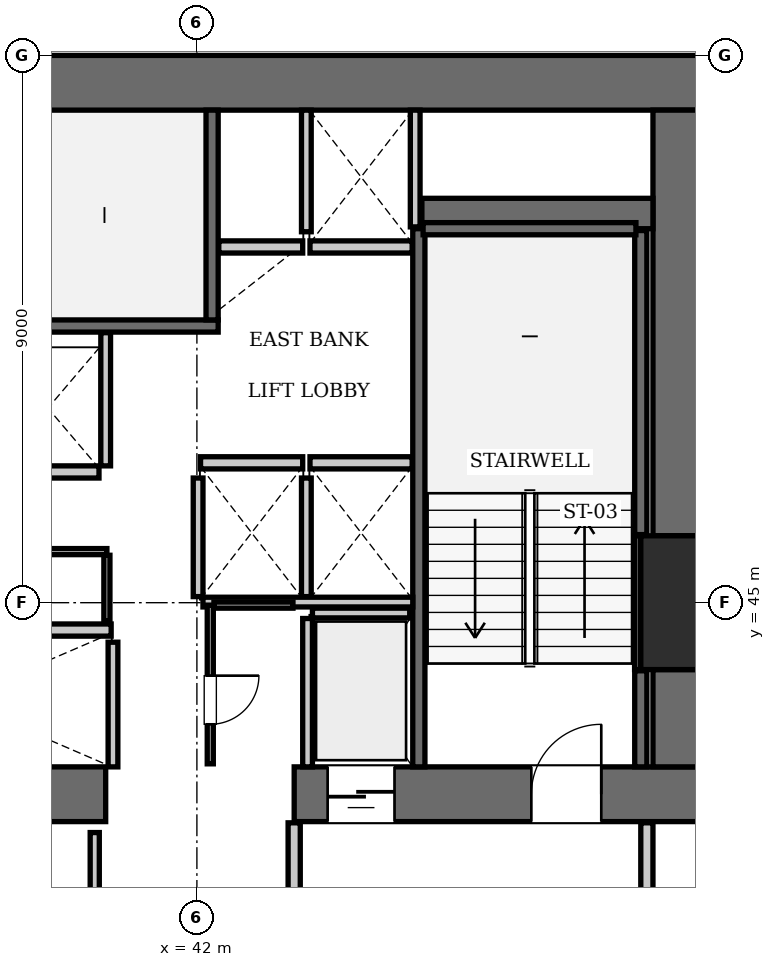
"""IFC4 building model, lengths in metres.
Left out: names, types, materials, properties, quantities, classifications, styles, units other than length and angle.
Written with IfcOpenShell. Run it as: python <this file> out.ifc"""

import sys

from ifc_helpers import new_model, si_unit, direction, frame, frame_2d, origin, origin_2d, place, context, subcontext, project, spatial, rectangle, extrude, element, fill, save


model = new_model("IFC4")
c1 = context("Model", 3, precision=1e-05, world=origin(), true_north=direction((0.0, 1.0)))
c2 = subcontext(c1, "Body", "Model", "MODEL_VIEW")
j1 = project(units=[si_unit("LENGTHUNIT", "METRE"), si_unit("PLANEANGLEUNIT", "RADIAN")], contexts=[c1])
p1 = place(None, origin())
s1 = spatial("IfcSite", under=j1, at=p1, CompositionType="ELEMENT")
p2 = place(p1, origin())
s2 = spatial("IfcBuilding", under=s1, at=p2, CompositionType="ELEMENT")
p3 = place(p2, frame((0.0, 0.0, 73.15)))
s3 = spatial("IfcBuildingStorey", under=s2, at=p3, CompositionType="ELEMENT", Elevation=73.15)
p4 = place(p3, frame((50.4, 45.0, 0.0), z_axis=(0.0, 0.0, 1.0), x_axis=(1.0, 0.0, 0.0)))
e1 = element("IfcColumn", 1, at=p4, inside=s3, PredefinedType="COLUMN", context=c2, shape_type="SweptSolid", body=[
    extrude(rectangle(XDim=2.2, YDim=2.2, at=origin_2d()), origin(), (0.0, 0.0, 1.0), 3.85),
])
p5 = place(p3, frame((25.2, 53.55, 0.0), z_axis=(0.0, 0.0, 1.0), x_axis=(1.0, 0.0, 0.0)))
e2 = element("IfcWall", 2, at=p5, inside=s3, PredefinedType="SHEAR", context=c2, shape_type="SweptSolid", body=[
    extrude(rectangle(XDim=25.2, YDim=0.9, at=frame_2d((12.6, 0.0))), origin(), (0.0, 0.0, 1.0), 3.85),
])
p6 = place(p3, frame((35.1, 41.85, 0.0), z_axis=(0.0, 0.0, 1.0), x_axis=(1.0, 0.0, 0.0)))
e3 = element("IfcWall", 3, at=p6, inside=s3, PredefinedType="SHEAR", context=c2, shape_type="SweptSolid", body=[
    extrude(rectangle(XDim=5.4, YDim=0.9, at=frame_2d((2.7, 0.0))), origin(), (0.0, 0.0, 1.0), 3.85),
])
p7 = place(p3, frame((43.6, 41.85, 0.0), z_axis=(0.0, 0.0, 1.0), x_axis=(1.0, 0.0, 0.0)))
e4 = element("IfcWall", 4, at=p7, inside=s3, PredefinedType="SHEAR", context=c2, shape_type="SweptSolid", body=[
    extrude(rectangle(XDim=6.8, YDim=0.9, at=frame_2d((3.4, 0.0))), origin(), (0.0, 0.0, 1.0), 3.85),
])
p8 = place(p7, frame((3.9, 0.0, 0.0)))
e5 = element("IfcOpeningElement", 5, at=p8, cuts=e4, PredefinedType="OPENING", context=c2, shape_type="SweptSolid", body=[
    extrude(rectangle(XDim=1.15, YDim=2.15, at=frame_2d((0.575, 1.075))), frame((0.0, 0.46, 0.0), z_axis=(0.0, -1.0, 0.0), x_axis=(1.0, 0.0, 0.0)), (0.0, 0.0, 1.0), 0.92),
])
p9 = place(p7, frame((0.55, 0.0, 0.0)))
e6 = element("IfcOpeningElement", 6, at=p9, cuts=e4, PredefinedType="OPENING", context=c2, shape_type="SweptSolid", body=[
    extrude(rectangle(XDim=1.1, YDim=2.2, at=frame_2d((0.55, 1.1))), frame((0.0, 0.46, 0.0), z_axis=(0.0, -1.0, 0.0), x_axis=(1.0, 0.0, 0.0)), (0.0, 0.0, 1.0), 0.92),
])
p10 = place(p3, frame((49.95, 42.3, 0.0), z_axis=(0.0, 0.0, 1.0), x_axis=(0.0, 1.0, 0.0)))
e7 = element("IfcWall", 7, at=p10, inside=s3, PredefinedType="SHEAR", context=c2, shape_type="SweptSolid", body=[
    extrude(rectangle(XDim=1.6, YDim=0.9, at=frame_2d((0.8, 0.0))), origin(), (0.0, 0.0, 1.0), 3.85),
])
p11 = place(p3, frame((49.95, 46.1, 0.0), z_axis=(0.0, 0.0, 1.0), x_axis=(0.0, 1.0, 0.0)))
e8 = element("IfcWall", 8, at=p11, inside=s3, PredefinedType="SHEAR", context=c2, shape_type="SweptSolid", body=[
    extrude(rectangle(XDim=7.0, YDim=0.9, at=frame_2d((3.5, 0.0))), origin(), (0.0, 0.0, 1.0), 3.85),
])
p12 = place(p3, frame((45.7, 51.4, 0.0), z_axis=(0.0, 0.0, 1.0), x_axis=(1.0, 0.0, 0.0)))
e9 = element("IfcWall", 9, at=p12, inside=s3, PredefinedType="SHEAR", context=c2, shape_type="SweptSolid", body=[
    extrude(rectangle(XDim=3.8, YDim=0.5, at=frame_2d((1.9, 0.0))), origin(), (0.0, 0.0, 1.0), 3.85),
])
p13 = place(p3, frame((33.25, 49.55, 0.0), z_axis=(0.0, 0.0, 1.0), x_axis=(1.0, 0.0, 0.0)))
e10 = element("IfcWall", 10, at=p13, inside=s3, PredefinedType="SOLIDWALL", context=c2, shape_type="SweptSolid", body=[
    extrude(rectangle(XDim=9.1, YDim=0.2, at=frame_2d((4.55, 0.0))), origin(), (0.0, 0.0, 1.0), 3.61),
])
p14 = place(p3, frame((42.25, 49.65, 0.0), z_axis=(0.0, 0.0, 1.0), x_axis=(0.0, 1.0, 0.0)))
e11 = element("IfcWall", 11, at=p14, inside=s3, PredefinedType="SOLIDWALL", context=c2, shape_type="SweptSolid", body=[
    extrude(rectangle(XDim=3.45, YDim=0.2, at=frame_2d((1.725, 0.0))), origin(), (0.0, 0.0, 1.0), 3.61),
])
p15 = place(p3, frame((45.65, 42.3, 0.0), z_axis=(0.0, 0.0, 1.0), x_axis=(0.0, 1.0, 0.0)))
e12 = element("IfcWall", 12, at=p15, inside=s3, PredefinedType="SOLIDWALL", context=c2, shape_type="SweptSolid", body=[
    extrude(rectangle(XDim=8.85, YDim=0.2, at=frame_2d((4.425, 0.0))), origin(), (0.0, 0.0, 1.0), 3.61),
])
p16 = place(p3, frame((49.3, 42.3, 0.0), z_axis=(0.0, 0.0, 1.0), x_axis=(0.0, 1.0, 0.0)))
e13 = element("IfcWall", 13, at=p16, inside=s3, PredefinedType="SOLIDWALL", context=c2, shape_type="SweptSolid", body=[
    extrude(rectangle(XDim=1.58, YDim=0.2, at=frame_2d((0.79, 0.0))), origin(), (0.0, 0.0, 1.0), 3.61),
])
p17 = place(p3, frame((49.3, 46.12, 0.0), z_axis=(0.0, 0.0, 1.0), x_axis=(0.0, 1.0, 0.0)))
e14 = element("IfcWall", 14, at=p17, inside=s3, PredefinedType="SOLIDWALL", context=c2, shape_type="SweptSolid", body=[
    extrude(rectangle(XDim=5.0, YDim=0.2, at=frame_2d((2.5, 0.0))), origin(), (0.0, 0.0, 1.0), 3.61),
])
p18 = place(p3, frame((45.72, 51.15, 0.0), z_axis=(0.0, 0.0, 1.0), x_axis=(1.0, 0.0, 0.0)))
e15 = element("IfcWall", 15, at=p18, inside=s3, PredefinedType="SOLIDWALL", context=c2, shape_type="SweptSolid", body=[
    extrude(rectangle(XDim=3.5, YDim=0.2, at=frame_2d((1.75, 0.0))), origin(), (0.0, 0.0, 1.0), 3.61),
])
p19 = place(p3, frame((49.248, 43.9, 0.0), z_axis=(0.0, 0.0, 1.0), x_axis=(0.0, 1.0, 0.0)))
e16 = element("IfcWall", 16, at=p19, inside=s3, PredefinedType="SOLIDWALL", context=c2, shape_type="SweptSolid", body=[
    extrude(rectangle(XDim=2.2, YDim=0.1, at=frame_2d((1.1, 0.0))), origin(), (0.0, 0.0, 1.0), 3.61),
])
for number, where, z_axis, x_axis in (
    (17, (42.06, 47.3, 0.0), (0.0, 0.0, 1.0), (1.0, 0.0, 0.0)),
    (18, (43.86, 47.3, 0.0), (0.0, 0.0, 1.0), (1.0, 0.0, 0.0)),
):
    element("IfcWall", number, at=place(p3, frame(where, z_axis=z_axis, x_axis=x_axis)), inside=s3, PredefinedType="SOLIDWALL", context=c2, shape_type="SweptSolid", body=[
        extrude(rectangle(XDim=1.68, YDim=0.2, at=frame_2d((0.84, 0.0))), origin(), (0.0, 0.0, 1.0), 3.61),
    ])
p20 = place(p3, frame((42.36, 50.85, 0.0), z_axis=(0.0, 0.0, 1.0), x_axis=(1.0, 0.0, 0.0)))
e19 = element("IfcWall", 19, at=p20, inside=s3, PredefinedType="SOLIDWALL", context=c2, shape_type="SweptSolid", body=[
    extrude(rectangle(XDim=1.38, YDim=0.2, at=frame_2d((0.69, 0.0))), origin(), (0.0, 0.0, 1.0), 3.61),
])
p21 = place(p3, frame((43.86, 50.85, 0.0), z_axis=(0.0, 0.0, 1.0), x_axis=(1.0, 0.0, 0.0)))
e20 = element("IfcWall", 20, at=p21, inside=s3, PredefinedType="SOLIDWALL", context=c2, shape_type="SweptSolid", body=[
    extrude(rectangle(XDim=1.68, YDim=0.2, at=frame_2d((0.84, 0.0))), origin(), (0.0, 0.0, 1.0), 3.61),
])
p22 = place(p3, frame((38.91, 44.55, 0.0), z_axis=(0.0, 0.0, 1.0), x_axis=(1.0, 0.0, 0.0)))
e21 = element("IfcWall", 21, at=p22, inside=s3, PredefinedType="SOLIDWALL", context=c2, shape_type="SweptSolid", body=[
    extrude(rectangle(XDim=1.68, YDim=0.2, at=frame_2d((0.84, 0.0))), origin(), (0.0, 0.0, 1.0), 3.61),
])
p23 = place(p3, frame((38.71, 47.15, 0.0), z_axis=(0.0, 0.0, 1.0), x_axis=(1.0, 0.0, 0.0)))
e22 = element("IfcWall", 22, at=p23, inside=s3, PredefinedType="SOLIDWALL", context=c2, shape_type="SweptSolid", body=[
    extrude(rectangle(XDim=1.68, YDim=0.2, at=frame_2d((0.84, 0.0))), origin(), (0.0, 0.0, 1.0), 3.61),
])
p24 = place(p3, frame((43.9, 44.83, 0.0), z_axis=(0.0, 0.0, 1.0), x_axis=(1.0, 0.0, 0.0)))
e23 = element("IfcWall", 23, at=p24, inside=s3, PredefinedType="SOLIDWALL", context=c2, shape_type="SweptSolid", body=[
    extrude(rectangle(XDim=1.6, YDim=0.16, at=frame_2d((0.8, 0.0))), origin(), (0.0, 0.0, 1.0), 3.61),
])
p25 = place(p3, frame((43.82, 42.3, 0.0), z_axis=(0.0, 0.0, 1.0), x_axis=(0.0, 1.0, 0.0)))
e24 = element("IfcWall", 24, at=p25, inside=s3, PredefinedType="SOLIDWALL", context=c2, shape_type="SweptSolid", body=[
    extrude(rectangle(XDim=2.44, YDim=0.16, at=frame_2d((1.22, 0.0))), origin(), (0.0, 0.0, 1.0), 3.61),
])
for number, where, z_axis, x_axis in (
    (25, (42.02, 45.1, 0.0), (0.0, 0.0, 1.0), (0.0, 1.0, 0.0)),
    (26, (43.8, 45.1, 0.0), (0.0, 0.0, 1.0), (0.0, 1.0, 0.0)),
):
    element("IfcWall", number, at=place(p3, frame(where, z_axis=z_axis, x_axis=x_axis)), inside=s3, PredefinedType="SOLIDWALL", context=c2, shape_type="SweptSolid", body=[
        extrude(rectangle(XDim=1.95, YDim=0.16, at=frame_2d((0.975, 0.0))), origin(), (0.0, 0.0, 1.0), 3.61),
    ])
p26 = place(p3, frame((42.1, 45.01, 0.0), z_axis=(0.0, 0.0, 1.0), x_axis=(1.0, 0.0, 0.0)))
e27 = element("IfcWall", 27, at=p26, inside=s3, PredefinedType="SOLIDWALL", context=c2, shape_type="SweptSolid", body=[
    extrude(rectangle(XDim=3.45, YDim=0.16, at=frame_2d((1.725, 0.0))), origin(), (0.0, 0.0, 1.0), 3.61),
])
p27 = place(p3, frame((45.59, 51.18, 0.0), z_axis=(0.0, 0.0, 1.0), x_axis=(0.0, 1.0, 0.0)))
e28 = element("IfcWall", 28, at=p27, inside=s3, PredefinedType="SOLIDWALL", context=c2, shape_type="SweptSolid", body=[
    extrude(rectangle(XDim=1.92, YDim=0.16, at=frame_2d((0.96, 0.0))), origin(), (0.0, 0.0, 1.0), 3.61),
])
p28 = place(p3, frame((43.8, 51.1, 0.0), z_axis=(0.0, 0.0, 1.0), x_axis=(0.0, 1.0, 0.0)))
e29 = element("IfcWall", 29, at=p28, inside=s3, PredefinedType="SOLIDWALL", context=c2, shape_type="SweptSolid", body=[
    extrude(rectangle(XDim=2.0, YDim=0.16, at=frame_2d((1.0, 0.0))), origin(), (0.0, 0.0, 1.0), 3.61),
])
p29 = place(p3, frame((40.62, 42.3, 0.0), z_axis=(0.0, 0.0, 1.0), x_axis=(0.0, 1.0, 0.0)))
e30 = element("IfcWall", 30, at=p29, inside=s3, PredefinedType="SOLIDWALL", context=c2, shape_type="SweptSolid", body=[
    extrude(rectangle(XDim=2.05, YDim=0.16, at=frame_2d((1.025, 0.0))), origin(), (0.0, 0.0, 1.0), 3.61),
])
p30 = place(p3, frame((40.5, 47.25, 0.0), z_axis=(0.0, 0.0, 1.0), x_axis=(0.0, 1.0, 0.0)))
e31 = element("IfcWall", 31, at=p30, inside=s3, PredefinedType="SOLIDWALL", context=c2, shape_type="SweptSolid", body=[
    extrude(rectangle(XDim=2.19, YDim=0.16, at=frame_2d((1.095, 0.0))), origin(), (0.0, 0.0, 1.0), 3.61),
])
for number, where, z_axis, x_axis in (
    (32, (43.6, 38.31, 0.0), (0.0, 0.0, 1.0), (0.0, 1.0, 0.0)),
    (33, (49.4, 38.31, 0.0), (0.0, 0.0, 1.0), (0.0, 1.0, 0.0)),
):
    element("IfcWall", number, at=place(p3, frame(where, z_axis=z_axis, x_axis=x_axis)), inside=s3, PredefinedType="PARTITIONING", context=c2, shape_type="SweptSolid", body=[
        extrude(rectangle(XDim=3.07, YDim=0.2, at=frame_2d((1.535, 0.0))), origin(), (0.0, 0.0, 1.0), 3.61),
    ])
p31 = place(p3, frame((38.02, 45.84, 0.0), z_axis=(0.0, 0.0, 1.0), x_axis=(1.0, 0.0, 0.0)))
e34 = element("IfcWall", 34, at=p31, inside=s3, PredefinedType="PARTITIONING", context=c2, shape_type="SweptSolid", body=[
    extrude(rectangle(XDim=2.5, YDim=0.1, at=frame_2d((1.25, 0.0))), origin(), (0.0, 0.0, 1.0), 3.61),
])
p32 = place(p31, frame((0.75, 0.0, 0.0)))
e35 = element("IfcOpeningElement", 35, at=p32, cuts=e34, PredefinedType="OPENING", context=c2, shape_type="SweptSolid", body=[
    extrude(rectangle(XDim=0.8, YDim=2.05, at=frame_2d((0.4, 1.025))), frame((0.0, 0.06, 0.0), z_axis=(0.0, -1.0, 0.0), x_axis=(1.0, 0.0, 0.0)), (0.0, 0.0, 1.0), 0.12),
])
p33 = place(p3, frame((40.52, 44.7, 0.0), z_axis=(0.0, 0.0, 1.0), x_axis=(0.0, 1.0, 0.0)))
e36 = element("IfcWall", 36, at=p33, inside=s3, PredefinedType="PARTITIONING", context=c2, shape_type="SweptSolid", body=[
    extrude(rectangle(XDim=1.08, YDim=0.1, at=frame_2d((0.54, 0.0))), origin(), (0.0, 0.0, 1.0), 3.61),
])
p34 = place(p3, frame((42.22, 42.35, 0.0), z_axis=(0.0, 0.0, 1.0), x_axis=(0.0, 1.0, 0.0)))
e37 = element("IfcWall", 37, at=p34, inside=s3, PredefinedType="PARTITIONING", context=c2, shape_type="SweptSolid", body=[
    extrude(rectangle(XDim=2.61, YDim=0.1, at=frame_2d((1.305, 0.0))), origin(), (0.0, 0.0, 1.0), 3.61),
])
p35 = place(p34, frame((0.65, 0.0, 0.0)))
e38 = element("IfcOpeningElement", 38, at=p35, cuts=e37, PredefinedType="OPENING", context=c2, shape_type="SweptSolid", body=[
    extrude(rectangle(XDim=0.8, YDim=2.05, at=frame_2d((0.4, 1.025))), frame((0.0, 0.06, 0.0), z_axis=(0.0, -1.0, 0.0), x_axis=(1.0, 0.0, 0.0)), (0.0, 0.0, 1.0), 0.12),
])
p36 = place(p3, frame((42.28, 44.96, 0.0), z_axis=(0.0, 0.0, 1.0), x_axis=(1.0, 0.0, 0.0)))
e39 = element("IfcWall", 39, at=p36, inside=s3, PredefinedType="PARTITIONING", context=c2, shape_type="SweptSolid", body=[
    extrude(rectangle(XDim=1.3, YDim=0.1, at=frame_2d((0.65, 0.0))), origin(), (0.0, 0.0, 1.0), 3.61),
])
p37 = place(p3, frame((40.32, 38.38, 0.0), z_axis=(0.0, 0.0, 1.0), x_axis=(0.0, 1.0, 0.0)))
e40 = element("IfcWall", 40, at=p37, inside=s3, PredefinedType="PARTITIONING", context=c2, shape_type="SweptSolid", body=[
    extrude(rectangle(XDim=2.84, YDim=0.15, at=frame_2d((1.42, 0.0))), origin(), (0.0, 0.0, 1.0), 3.61),
])
p38 = place(p8, origin())
e41 = element("IfcDoor", 41, at=p38, inside=s3, OperationType="SINGLE_SWING_RIGHT", PredefinedType="DOOR", context=c2, shape_type="SweptSolid", body=[
    extrude(rectangle(XDim=1.15, YDim=2.15, at=frame_2d((0.575, 1.075))), frame((0.0, 0.025, 0.0), z_axis=(0.0, -1.0, 0.0), x_axis=(1.0, 0.0, 0.0)), (0.0, 0.0, 1.0), 0.05),
])
fill(e5, e41)
p39 = place(p9, frame((1.1, 0.0, 0.0), z_axis=(0.0, 0.0, 1.0), x_axis=(-1.0, 0.0, 0.0)))
e42 = element("IfcDoor", 42, at=p39, inside=s3, OperationType="SLIDING_TO_LEFT", PredefinedType="DOOR", context=c2, shape_type="SweptSolid", body=[
    extrude(rectangle(XDim=1.1, YDim=2.2, at=frame_2d((0.55, 1.1))), frame((0.0, 0.025, 0.0), z_axis=(0.0, -1.0, 0.0), x_axis=(1.0, 0.0, 0.0)), (0.0, 0.0, 1.0), 0.05),
])
fill(e6, e42)
p40 = place(p35, frame((0.8, 0.0, 0.0), z_axis=(0.0, 0.0, 1.0), x_axis=(-1.0, 0.0, 0.0)))
e43 = element("IfcDoor", 43, at=p40, inside=s3, OperationType="SINGLE_SWING_LEFT", PredefinedType="DOOR", context=c2, shape_type="SweptSolid", body=[
    extrude(rectangle(XDim=0.8, YDim=2.05, at=frame_2d((0.4, 1.025))), frame((0.0, 0.025, 0.0), z_axis=(0.0, -1.0, 0.0), x_axis=(1.0, 0.0, 0.0)), (0.0, 0.0, 1.0), 0.05),
])
fill(e38, e43)
save(model, sys.argv[1])
